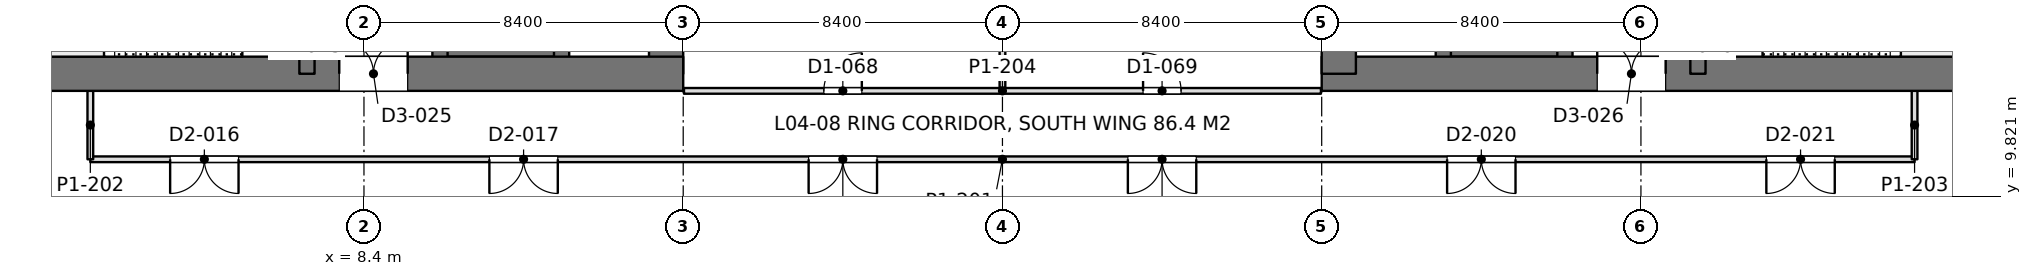
"""IFC4 building model, lengths in metres.
Left out: names, types, materials, properties, quantities, classifications, styles, units other than length and angle.
Written with IfcOpenShell. Run it as: python <this file> out.ifc"""

import sys

from ifc_helpers import new_model, si_unit, direction, frame, frame_2d, origin, place, context, subcontext, project, spatial, rectangle, extrude, element, fill, save


model = new_model("IFC4")
c1 = context("Model", 3, precision=1e-05, world=origin(), true_north=direction((0.0, 1.0)))
c2 = subcontext(c1, "Body", "Model", "MODEL_VIEW")
j1 = project(units=[si_unit("LENGTHUNIT", "METRE"), si_unit("PLANEANGLEUNIT", "RADIAN")], contexts=[c1])
p1 = place(None, origin())
s1 = spatial("IfcSite", under=j1, at=p1, CompositionType="ELEMENT")
p2 = place(p1, origin())
s2 = spatial("IfcBuilding", under=s1, at=p2, CompositionType="ELEMENT")
p3 = place(p2, frame((0.0, 0.0, 18.9)))
s3 = spatial("IfcBuildingStorey", under=s2, at=p3, CompositionType="ELEMENT", Elevation=18.9)
p4 = place(p3, frame((-1.2, 13.05, 0.0), z_axis=(0.0, 0.0, 1.0), x_axis=(1.0, 0.0, 0.0)))
e1 = element("IfcWall", 1, at=p4, inside=s3, PredefinedType="SHEAR", context=c2, shape_type="SweptSolid", body=[
    extrude(rectangle(XDim=18.0, YDim=0.9, at=frame_2d((9.0, 0.0))), origin(), (0.0, 0.0, 1.0), 4.5),
])
p5 = place(p4, frame((8.95, 0.0, 0.0)))
e2 = element("IfcOpeningElement", 2, at=p5, cuts=e1, PredefinedType="OPENING", context=c2, shape_type="SweptSolid", body=[
    extrude(rectangle(XDim=1.8, YDim=2.4, at=frame_2d((0.9, 1.2))), frame((0.0, 0.46, 0.0), z_axis=(0.0, -1.0, 0.0), x_axis=(1.0, 0.0, 0.0)), (0.0, 0.0, 1.0), 0.92),
])
p6 = place(p3, frame((16.35, 13.05, 0.0), z_axis=(0.0, 0.0, 1.0), x_axis=(0.0, 1.0, 0.0)))
e3 = element("IfcWall", 3, at=p6, inside=s3, PredefinedType="SHEAR", context=c2, shape_type="SweptSolid", body=[
    extrude(rectangle(XDim=24.3, YDim=0.9, at=frame_2d((12.15, 0.0))), origin(), (0.0, 0.0, 1.0), 4.5),
])
p7 = place(p3, frame((6.9, 13.05, 0.0), z_axis=(0.0, 0.0, 1.0), x_axis=(0.0, 1.0, 0.0)))
e4 = element("IfcWall", 4, at=p7, inside=s3, PredefinedType="SHEAR", context=c2, shape_type="SweptSolid", body=[
    extrude(rectangle(XDim=24.3, YDim=0.4, at=frame_2d((12.15, 0.0))), origin(), (0.0, 0.0, 1.0), 4.5),
])
p8 = place(p7, frame((1.3, 0.0, 0.0)))
e5 = element("IfcOpeningElement", 5, at=p8, cuts=e4, PredefinedType="OPENING", context=c2, shape_type="SweptSolid", body=[
    extrude(rectangle(XDim=1.0, YDim=2.2, at=frame_2d((0.5, 1.1))), frame((0.0, 0.21, 0.0), z_axis=(0.0, -1.0, 0.0), x_axis=(1.0, 0.0, 0.0)), (0.0, 0.0, 1.0), 0.42),
])
p9 = place(p7, frame((22.0, 0.0, 0.0)))
e6 = element("IfcOpeningElement", 6, at=p9, cuts=e4, PredefinedType="OPENING", context=c2, shape_type="SweptSolid", body=[
    extrude(rectangle(XDim=1.0, YDim=2.2, at=frame_2d((0.5, 1.1))), frame((0.0, 0.21, 0.0), z_axis=(0.0, -1.0, 0.0), x_axis=(1.0, 0.0, 0.0)), (0.0, 0.0, 1.0), 0.42),
])
p10 = place(p7, frame((5.55, 0.0, 0.0)))
e7 = element("IfcOpeningElement", 7, at=p10, cuts=e4, PredefinedType="OPENING", context=c2, shape_type="SweptSolid", body=[
    extrude(rectangle(XDim=1.0, YDim=2.2, at=frame_2d((0.5, 1.1))), frame((0.0, 0.21, 0.0), z_axis=(0.0, -1.0, 0.0), x_axis=(1.0, 0.0, 0.0)), (0.0, 0.0, 1.0), 0.42),
])
p11 = place(p7, frame((9.55, 0.0, 0.0)))
e8 = element("IfcOpeningElement", 8, at=p11, cuts=e4, PredefinedType="OPENING", context=c2, shape_type="SweptSolid", body=[
    extrude(rectangle(XDim=1.0, YDim=2.2, at=frame_2d((0.5, 1.1))), frame((0.0, 0.21, 0.0), z_axis=(0.0, -1.0, 0.0), x_axis=(1.0, 0.0, 0.0)), (0.0, 0.0, 1.0), 0.42),
])
p12 = place(p7, frame((12.8, 0.0, 0.0)))
e9 = element("IfcOpeningElement", 9, at=p12, cuts=e4, PredefinedType="OPENING", context=c2, shape_type="SweptSolid", body=[
    extrude(rectangle(XDim=1.1, YDim=2.2, at=frame_2d((0.55, 1.1))), frame((0.0, 0.21, 0.0), z_axis=(0.0, -1.0, 0.0), x_axis=(1.0, 0.0, 0.0)), (0.0, 0.0, 1.0), 0.42),
])
p13 = place(p7, frame((15.538, 0.0, 0.0)))
e10 = element("IfcOpeningElement", 10, at=p13, cuts=e4, PredefinedType="OPENING", context=c2, shape_type="SweptSolid", body=[
    extrude(rectangle(XDim=1.1, YDim=2.2, at=frame_2d((0.55, 1.1))), frame((0.0, 0.21, 0.0), z_axis=(0.0, -1.0, 0.0), x_axis=(1.0, 0.0, 0.0)), (0.0, 0.0, 1.0), 0.42),
])
p14 = place(p7, frame((18.262, 0.0, 0.0)))
e11 = element("IfcOpeningElement", 11, at=p14, cuts=e4, PredefinedType="OPENING", context=c2, shape_type="SweptSolid", body=[
    extrude(rectangle(XDim=1.1, YDim=2.2, at=frame_2d((0.55, 1.1))), frame((0.0, 0.21, 0.0), z_axis=(0.0, -1.0, 0.0), x_axis=(1.0, 0.0, 0.0)), (0.0, 0.0, 1.0), 0.42),
])
p15 = place(p3, frame((10.4, 13.05, 0.0), z_axis=(0.0, 0.0, 1.0), x_axis=(0.0, 1.0, 0.0)))
e12 = element("IfcWall", 12, at=p15, inside=s3, PredefinedType="SHEAR", context=c2, shape_type="SweptSolid", body=[
    extrude(rectangle(XDim=24.3, YDim=0.4, at=frame_2d((12.15, 0.0))), origin(), (0.0, 0.0, 1.0), 4.5),
])
p16 = place(p15, frame((1.5, 0.0, 0.0)))
e13 = element("IfcOpeningElement", 13, at=p16, cuts=e12, PredefinedType="OPENING", context=c2, shape_type="SweptSolid", body=[
    extrude(rectangle(XDim=1.1, YDim=2.2, at=frame_2d((0.55, 1.1))), frame((0.0, 0.21, 0.0), z_axis=(0.0, -1.0, 0.0), x_axis=(1.0, 0.0, 0.0)), (0.0, 0.0, 1.0), 0.42),
])
p17 = place(p15, frame((4.35, 0.0, 0.0)))
e14 = element("IfcOpeningElement", 14, at=p17, cuts=e12, PredefinedType="OPENING", context=c2, shape_type="SweptSolid", body=[
    extrude(rectangle(XDim=1.1, YDim=2.2, at=frame_2d((0.55, 1.1))), frame((0.0, 0.21, 0.0), z_axis=(0.0, -1.0, 0.0), x_axis=(1.0, 0.0, 0.0)), (0.0, 0.0, 1.0), 0.42),
])
p18 = place(p15, frame((7.2, 0.0, 0.0)))
e15 = element("IfcOpeningElement", 15, at=p18, cuts=e12, PredefinedType="OPENING", context=c2, shape_type="SweptSolid", body=[
    extrude(rectangle(XDim=1.1, YDim=2.2, at=frame_2d((0.55, 1.1))), frame((0.0, 0.21, 0.0), z_axis=(0.0, -1.0, 0.0), x_axis=(1.0, 0.0, 0.0)), (0.0, 0.0, 1.0), 0.42),
])
p19 = place(p15, frame((21.45, 0.0, 0.0)))
e16 = element("IfcOpeningElement", 16, at=p19, cuts=e12, PredefinedType="OPENING", context=c2, shape_type="SweptSolid", body=[
    extrude(rectangle(XDim=1.1, YDim=2.2, at=frame_2d((0.55, 1.1))), frame((0.0, 0.21, 0.0), z_axis=(0.0, -1.0, 0.0), x_axis=(1.0, 0.0, 0.0)), (0.0, 0.0, 1.0), 0.42),
])
p20 = place(p3, frame((13.6, 13.05, 0.0), z_axis=(0.0, 0.0, 1.0), x_axis=(0.0, 1.0, 0.0)))
e17 = element("IfcWall", 17, at=p20, inside=s3, PredefinedType="SHEAR", context=c2, shape_type="SweptSolid", body=[
    extrude(rectangle(XDim=24.3, YDim=0.4, at=frame_2d((12.15, 0.0))), origin(), (0.0, 0.0, 1.0), 4.5),
])
p21 = place(p3, frame((10.4, 13.65, 0.0), z_axis=(0.0, 0.0, 1.0), x_axis=(1.0, 0.0, 0.0)))
e18 = element("IfcWall", 18, at=p21, inside=s3, PredefinedType="SHEAR", context=c2, shape_type="SweptSolid", body=[
    extrude(rectangle(XDim=3.2, YDim=0.3, at=frame_2d((1.6, 0.0))), origin(), (0.0, 0.0, 1.0), 4.5),
])
p22 = place(p3, frame((33.6, 13.05, 0.0), z_axis=(0.0, 0.0, 1.0), x_axis=(1.0, 0.0, 0.0)))
e19 = element("IfcWall", 19, at=p22, inside=s3, PredefinedType="SHEAR", context=c2, shape_type="SweptSolid", body=[
    extrude(rectangle(XDim=18.0, YDim=0.9, at=frame_2d((9.0, 0.0))), origin(), (0.0, 0.0, 1.0), 4.5),
])
p23 = place(p22, frame((7.25, 0.0, 0.0)))
e20 = element("IfcOpeningElement", 20, at=p23, cuts=e19, PredefinedType="OPENING", context=c2, shape_type="SweptSolid", body=[
    extrude(rectangle(XDim=1.8, YDim=2.4, at=frame_2d((0.9, 1.2))), frame((0.0, 0.46, 0.0), z_axis=(0.0, -1.0, 0.0), x_axis=(1.0, 0.0, 0.0)), (0.0, 0.0, 1.0), 0.92),
])
p24 = place(p3, frame((34.05, 13.05, 0.0), z_axis=(0.0, 0.0, 1.0), x_axis=(0.0, 1.0, 0.0)))
e21 = element("IfcWall", 21, at=p24, inside=s3, PredefinedType="SHEAR", context=c2, shape_type="SweptSolid", body=[
    extrude(rectangle(XDim=24.3, YDim=0.9, at=frame_2d((12.15, 0.0))), origin(), (0.0, 0.0, 1.0), 4.5),
])
p25 = place(p3, frame((43.5, 13.05, 0.0), z_axis=(0.0, 0.0, 1.0), x_axis=(0.0, 1.0, 0.0)))
e22 = element("IfcWall", 22, at=p25, inside=s3, PredefinedType="SHEAR", context=c2, shape_type="SweptSolid", body=[
    extrude(rectangle(XDim=24.3, YDim=0.4, at=frame_2d((12.15, 0.0))), origin(), (0.0, 0.0, 1.0), 4.5),
])
p26 = place(p25, frame((1.3, 0.0, 0.0)))
e23 = element("IfcOpeningElement", 23, at=p26, cuts=e22, PredefinedType="OPENING", context=c2, shape_type="SweptSolid", body=[
    extrude(rectangle(XDim=1.0, YDim=2.2, at=frame_2d((0.5, 1.1))), frame((0.0, 0.21, 0.0), z_axis=(0.0, -1.0, 0.0), x_axis=(1.0, 0.0, 0.0)), (0.0, 0.0, 1.0), 0.42),
])
p27 = place(p25, frame((22.0, 0.0, 0.0)))
e24 = element("IfcOpeningElement", 24, at=p27, cuts=e22, PredefinedType="OPENING", context=c2, shape_type="SweptSolid", body=[
    extrude(rectangle(XDim=1.0, YDim=2.2, at=frame_2d((0.5, 1.1))), frame((0.0, 0.21, 0.0), z_axis=(0.0, -1.0, 0.0), x_axis=(1.0, 0.0, 0.0)), (0.0, 0.0, 1.0), 0.42),
])
p28 = place(p25, frame((5.55, 0.0, 0.0)))
e25 = element("IfcOpeningElement", 25, at=p28, cuts=e22, PredefinedType="OPENING", context=c2, shape_type="SweptSolid", body=[
    extrude(rectangle(XDim=1.0, YDim=2.2, at=frame_2d((0.5, 1.1))), frame((0.0, 0.21, 0.0), z_axis=(0.0, -1.0, 0.0), x_axis=(1.0, 0.0, 0.0)), (0.0, 0.0, 1.0), 0.42),
])
p29 = place(p25, frame((9.55, 0.0, 0.0)))
e26 = element("IfcOpeningElement", 26, at=p29, cuts=e22, PredefinedType="OPENING", context=c2, shape_type="SweptSolid", body=[
    extrude(rectangle(XDim=1.0, YDim=2.2, at=frame_2d((0.5, 1.1))), frame((0.0, 0.21, 0.0), z_axis=(0.0, -1.0, 0.0), x_axis=(1.0, 0.0, 0.0)), (0.0, 0.0, 1.0), 0.42),
])
p30 = place(p25, frame((12.8, 0.0, 0.0)))
e27 = element("IfcOpeningElement", 27, at=p30, cuts=e22, PredefinedType="OPENING", context=c2, shape_type="SweptSolid", body=[
    extrude(rectangle(XDim=1.1, YDim=2.2, at=frame_2d((0.55, 1.1))), frame((0.0, 0.21, 0.0), z_axis=(0.0, -1.0, 0.0), x_axis=(1.0, 0.0, 0.0)), (0.0, 0.0, 1.0), 0.42),
])
p31 = place(p25, frame((15.538, 0.0, 0.0)))
e28 = element("IfcOpeningElement", 28, at=p31, cuts=e22, PredefinedType="OPENING", context=c2, shape_type="SweptSolid", body=[
    extrude(rectangle(XDim=1.1, YDim=2.2, at=frame_2d((0.55, 1.1))), frame((0.0, 0.21, 0.0), z_axis=(0.0, -1.0, 0.0), x_axis=(1.0, 0.0, 0.0)), (0.0, 0.0, 1.0), 0.42),
])
p32 = place(p25, frame((18.262, 0.0, 0.0)))
e29 = element("IfcOpeningElement", 29, at=p32, cuts=e22, PredefinedType="OPENING", context=c2, shape_type="SweptSolid", body=[
    extrude(rectangle(XDim=1.1, YDim=2.2, at=frame_2d((0.55, 1.1))), frame((0.0, 0.21, 0.0), z_axis=(0.0, -1.0, 0.0), x_axis=(1.0, 0.0, 0.0)), (0.0, 0.0, 1.0), 0.42),
])
p33 = place(p3, frame((40.0, 13.05, 0.0), z_axis=(0.0, 0.0, 1.0), x_axis=(0.0, 1.0, 0.0)))
e30 = element("IfcWall", 30, at=p33, inside=s3, PredefinedType="SHEAR", context=c2, shape_type="SweptSolid", body=[
    extrude(rectangle(XDim=24.3, YDim=0.4, at=frame_2d((12.15, 0.0))), origin(), (0.0, 0.0, 1.0), 4.5),
])
p34 = place(p33, frame((1.5, 0.0, 0.0)))
e31 = element("IfcOpeningElement", 31, at=p34, cuts=e30, PredefinedType="OPENING", context=c2, shape_type="SweptSolid", body=[
    extrude(rectangle(XDim=1.1, YDim=2.2, at=frame_2d((0.55, 1.1))), frame((0.0, 0.21, 0.0), z_axis=(0.0, -1.0, 0.0), x_axis=(1.0, 0.0, 0.0)), (0.0, 0.0, 1.0), 0.42),
])
p35 = place(p33, frame((4.35, 0.0, 0.0)))
e32 = element("IfcOpeningElement", 32, at=p35, cuts=e30, PredefinedType="OPENING", context=c2, shape_type="SweptSolid", body=[
    extrude(rectangle(XDim=1.1, YDim=2.2, at=frame_2d((0.55, 1.1))), frame((0.0, 0.21, 0.0), z_axis=(0.0, -1.0, 0.0), x_axis=(1.0, 0.0, 0.0)), (0.0, 0.0, 1.0), 0.42),
])
p36 = place(p33, frame((7.2, 0.0, 0.0)))
e33 = element("IfcOpeningElement", 33, at=p36, cuts=e30, PredefinedType="OPENING", context=c2, shape_type="SweptSolid", body=[
    extrude(rectangle(XDim=1.1, YDim=2.2, at=frame_2d((0.55, 1.1))), frame((0.0, 0.21, 0.0), z_axis=(0.0, -1.0, 0.0), x_axis=(1.0, 0.0, 0.0)), (0.0, 0.0, 1.0), 0.42),
])
p37 = place(p33, frame((21.45, 0.0, 0.0)))
e34 = element("IfcOpeningElement", 34, at=p37, cuts=e30, PredefinedType="OPENING", context=c2, shape_type="SweptSolid", body=[
    extrude(rectangle(XDim=1.1, YDim=2.2, at=frame_2d((0.55, 1.1))), frame((0.0, 0.21, 0.0), z_axis=(0.0, -1.0, 0.0), x_axis=(1.0, 0.0, 0.0)), (0.0, 0.0, 1.0), 0.42),
])
p38 = place(p3, frame((36.8, 13.05, 0.0), z_axis=(0.0, 0.0, 1.0), x_axis=(0.0, 1.0, 0.0)))
e35 = element("IfcWall", 35, at=p38, inside=s3, PredefinedType="SHEAR", context=c2, shape_type="SweptSolid", body=[
    extrude(rectangle(XDim=24.3, YDim=0.4, at=frame_2d((12.15, 0.0))), origin(), (0.0, 0.0, 1.0), 4.5),
])
p39 = place(p3, frame((40.0, 13.65, 0.0), z_axis=(0.0, 0.0, 1.0), x_axis=(-1.0, 0.0, 0.0)))
e36 = element("IfcWall", 36, at=p39, inside=s3, PredefinedType="SHEAR", context=c2, shape_type="SweptSolid", body=[
    extrude(rectangle(XDim=3.2, YDim=0.3, at=frame_2d((1.6, 0.0))), origin(), (0.0, 0.0, 1.0), 4.5),
])
p40 = place(p3, frame((1.2, 10.8, 0.0), z_axis=(0.0, 0.0, 1.0), x_axis=(1.0, 0.0, 0.0)))
e37 = element("IfcWall", 37, at=p40, inside=s3, PredefinedType="PARTITIONING", context=c2, shape_type="SweptSolid", body=[
    extrude(rectangle(XDim=48.0, YDim=0.15, at=frame_2d((24.0, 0.0))), origin(), (0.0, 0.0, 1.0), 3.74),
])
p41 = place(p40, frame((2.1, 0.0, 0.0)))
e38 = element("IfcOpeningElement", 38, at=p41, cuts=e37, PredefinedType="OPENING", context=c2, shape_type="SweptSolid", body=[
    extrude(rectangle(XDim=1.8, YDim=2.2, at=frame_2d((0.9, 1.1))), frame((0.0, 0.085, 0.0), z_axis=(0.0, -1.0, 0.0), x_axis=(1.0, 0.0, 0.0)), (0.0, 0.0, 1.0), 0.17),
])
p42 = place(p40, frame((10.5, 0.0, 0.0)))
e39 = element("IfcOpeningElement", 39, at=p42, cuts=e37, PredefinedType="OPENING", context=c2, shape_type="SweptSolid", body=[
    extrude(rectangle(XDim=1.8, YDim=2.2, at=frame_2d((0.9, 1.1))), frame((0.0, 0.085, 0.0), z_axis=(0.0, -1.0, 0.0), x_axis=(1.0, 0.0, 0.0)), (0.0, 0.0, 1.0), 0.17),
])
p43 = place(p40, frame((18.9, 0.0, 0.0)))
e40 = element("IfcOpeningElement", 40, at=p43, cuts=e37, PredefinedType="OPENING", context=c2, shape_type="SweptSolid", body=[
    extrude(rectangle(XDim=1.8, YDim=2.2, at=frame_2d((0.9, 1.1))), frame((0.0, 0.085, 0.0), z_axis=(0.0, -1.0, 0.0), x_axis=(1.0, 0.0, 0.0)), (0.0, 0.0, 1.0), 0.17),
])
p44 = place(p40, frame((27.3, 0.0, 0.0)))
e41 = element("IfcOpeningElement", 41, at=p44, cuts=e37, PredefinedType="OPENING", context=c2, shape_type="SweptSolid", body=[
    extrude(rectangle(XDim=1.8, YDim=2.2, at=frame_2d((0.9, 1.1))), frame((0.0, 0.085, 0.0), z_axis=(0.0, -1.0, 0.0), x_axis=(1.0, 0.0, 0.0)), (0.0, 0.0, 1.0), 0.17),
])
p45 = place(p40, frame((35.7, 0.0, 0.0)))
e42 = element("IfcOpeningElement", 42, at=p45, cuts=e37, PredefinedType="OPENING", context=c2, shape_type="SweptSolid", body=[
    extrude(rectangle(XDim=1.8, YDim=2.2, at=frame_2d((0.9, 1.1))), frame((0.0, 0.085, 0.0), z_axis=(0.0, -1.0, 0.0), x_axis=(1.0, 0.0, 0.0)), (0.0, 0.0, 1.0), 0.17),
])
p46 = place(p40, frame((44.1, 0.0, 0.0)))
e43 = element("IfcOpeningElement", 43, at=p46, cuts=e37, PredefinedType="OPENING", context=c2, shape_type="SweptSolid", body=[
    extrude(rectangle(XDim=1.8, YDim=2.2, at=frame_2d((0.9, 1.1))), frame((0.0, 0.085, 0.0), z_axis=(0.0, -1.0, 0.0), x_axis=(1.0, 0.0, 0.0)), (0.0, 0.0, 1.0), 0.17),
])
for number, where, z_axis, x_axis in (
    (44, (1.2, 10.8, 0.0), (0.0, 0.0, 1.0), (0.0, 1.0, 0.0)),
    (45, (49.2, 10.8, 0.0), (0.0, 0.0, 1.0), (0.0, 1.0, 0.0)),
):
    element("IfcWall", number, at=place(p3, frame(where, z_axis=z_axis, x_axis=x_axis)), inside=s3, PredefinedType="PARTITIONING", context=c2, shape_type="SweptSolid", body=[
        extrude(rectangle(XDim=1.802, YDim=0.15, at=frame_2d((0.901, 0.0))), origin(), (0.0, 0.0, 1.0), 4.34),
    ])
p47 = place(p3, frame((25.2, 12.674, 0.0), z_axis=(0.0, 0.0, 1.0), x_axis=(0.0, 1.0, 0.0)))
e46 = element("IfcWall", 46, at=p47, inside=s3, PredefinedType="PARTITIONING", context=c2, shape_type="SweptSolid", body=[
    extrude(rectangle(XDim=3.527, YDim=0.15, at=frame_2d((1.763, 0.0))), origin(), (0.0, 0.0, 1.0), 3.74),
])
p48 = place(p3, frame((16.82, 12.6, 0.0), z_axis=(0.0, 0.0, 1.0), x_axis=(1.0, 0.0, 0.0)))
e47 = element("IfcWall", 47, at=p48, inside=s3, PredefinedType="PARTITIONING", context=c2, shape_type="SweptSolid", body=[
    extrude(rectangle(XDim=16.76, YDim=0.15, at=frame_2d((8.38, 0.0))), origin(), (0.0, 0.0, 1.0), 3.74),
])
p49 = place(p48, frame((3.68, 0.0, 0.0)))
e48 = element("IfcOpeningElement", 48, at=p49, cuts=e47, PredefinedType="OPENING", context=c2, shape_type="SweptSolid", body=[
    extrude(rectangle(XDim=1.0, YDim=2.2, at=frame_2d((0.5, 1.1))), frame((0.0, 0.085, 0.0), z_axis=(0.0, -1.0, 0.0), x_axis=(1.0, 0.0, 0.0)), (0.0, 0.0, 1.0), 0.17),
])
p50 = place(p48, frame((12.08, 0.0, 0.0)))
e49 = element("IfcOpeningElement", 49, at=p50, cuts=e47, PredefinedType="OPENING", context=c2, shape_type="SweptSolid", body=[
    extrude(rectangle(XDim=1.0, YDim=2.2, at=frame_2d((0.5, 1.1))), frame((0.0, 0.085, 0.0), z_axis=(0.0, -1.0, 0.0), x_axis=(1.0, 0.0, 0.0)), (0.0, 0.0, 1.0), 0.17),
])
p51 = place(p5, origin())
e50 = element("IfcDoor", 50, at=p51, inside=s3, OperationType="DOUBLE_DOOR_SINGLE_SWING", PredefinedType="DOOR", context=c2, shape_type="SweptSolid", body=[
    extrude(rectangle(XDim=1.8, YDim=2.4, at=frame_2d((0.9, 1.2))), frame((0.0, 0.025, 0.0), z_axis=(0.0, -1.0, 0.0), x_axis=(1.0, 0.0, 0.0)), (0.0, 0.0, 1.0), 0.05),
])
fill(e2, e50)
p52 = place(p23, origin())
e51 = element("IfcDoor", 51, at=p52, inside=s3, OperationType="DOUBLE_DOOR_SINGLE_SWING", PredefinedType="DOOR", context=c2, shape_type="SweptSolid", body=[
    extrude(rectangle(XDim=1.8, YDim=2.4, at=frame_2d((0.9, 1.2))), frame((0.0, 0.025, 0.0), z_axis=(0.0, -1.0, 0.0), x_axis=(1.0, 0.0, 0.0)), (0.0, 0.0, 1.0), 0.05),
])
fill(e20, e51)
p53 = place(p41, frame((1.8, 0.0, 0.0), z_axis=(0.0, 0.0, 1.0), x_axis=(-1.0, 0.0, 0.0)))
e52 = element("IfcDoor", 52, at=p53, inside=s3, OperationType="DOUBLE_DOOR_SINGLE_SWING", PredefinedType="DOOR", context=c2, shape_type="SweptSolid", body=[
    extrude(rectangle(XDim=1.8, YDim=2.2, at=frame_2d((0.9, 1.1))), frame((0.0, 0.025, 0.0), z_axis=(0.0, -1.0, 0.0), x_axis=(1.0, 0.0, 0.0)), (0.0, 0.0, 1.0), 0.05),
])
fill(e38, e52)
p54 = place(p42, frame((1.8, 0.0, 0.0), z_axis=(0.0, 0.0, 1.0), x_axis=(-1.0, 0.0, 0.0)))
e53 = element("IfcDoor", 53, at=p54, inside=s3, OperationType="DOUBLE_DOOR_SINGLE_SWING", PredefinedType="DOOR", context=c2, shape_type="SweptSolid", body=[
    extrude(rectangle(XDim=1.8, YDim=2.2, at=frame_2d((0.9, 1.1))), frame((0.0, 0.025, 0.0), z_axis=(0.0, -1.0, 0.0), x_axis=(1.0, 0.0, 0.0)), (0.0, 0.0, 1.0), 0.05),
])
fill(e39, e53)
p55 = place(p43, frame((1.8, 0.0, 0.0), z_axis=(0.0, 0.0, 1.0), x_axis=(-1.0, 0.0, 0.0)))
e54 = element("IfcDoor", 54, at=p55, inside=s3, OperationType="DOUBLE_DOOR_SINGLE_SWING", PredefinedType="DOOR", context=c2, shape_type="SweptSolid", body=[
    extrude(rectangle(XDim=1.8, YDim=2.2, at=frame_2d((0.9, 1.1))), frame((0.0, 0.025, 0.0), z_axis=(0.0, -1.0, 0.0), x_axis=(1.0, 0.0, 0.0)), (0.0, 0.0, 1.0), 0.05),
])
fill(e40, e54)
p56 = place(p44, frame((1.8, 0.0, 0.0), z_axis=(0.0, 0.0, 1.0), x_axis=(-1.0, 0.0, 0.0)))
e55 = element("IfcDoor", 55, at=p56, inside=s3, OperationType="DOUBLE_DOOR_SINGLE_SWING", PredefinedType="DOOR", context=c2, shape_type="SweptSolid", body=[
    extrude(rectangle(XDim=1.8, YDim=2.2, at=frame_2d((0.9, 1.1))), frame((0.0, 0.025, 0.0), z_axis=(0.0, -1.0, 0.0), x_axis=(1.0, 0.0, 0.0)), (0.0, 0.0, 1.0), 0.05),
])
fill(e41, e55)
p57 = place(p45, frame((1.8, 0.0, 0.0), z_axis=(0.0, 0.0, 1.0), x_axis=(-1.0, 0.0, 0.0)))
e56 = element("IfcDoor", 56, at=p57, inside=s3, OperationType="DOUBLE_DOOR_SINGLE_SWING", PredefinedType="DOOR", context=c2, shape_type="SweptSolid", body=[
    extrude(rectangle(XDim=1.8, YDim=2.2, at=frame_2d((0.9, 1.1))), frame((0.0, 0.025, 0.0), z_axis=(0.0, -1.0, 0.0), x_axis=(1.0, 0.0, 0.0)), (0.0, 0.0, 1.0), 0.05),
])
fill(e42, e56)
p58 = place(p46, frame((1.8, 0.0, 0.0), z_axis=(0.0, 0.0, 1.0), x_axis=(-1.0, 0.0, 0.0)))
e57 = element("IfcDoor", 57, at=p58, inside=s3, OperationType="DOUBLE_DOOR_SINGLE_SWING", PredefinedType="DOOR", context=c2, shape_type="SweptSolid", body=[
    extrude(rectangle(XDim=1.8, YDim=2.2, at=frame_2d((0.9, 1.1))), frame((0.0, 0.025, 0.0), z_axis=(0.0, -1.0, 0.0), x_axis=(1.0, 0.0, 0.0)), (0.0, 0.0, 1.0), 0.05),
])
fill(e43, e57)
p59 = place(p49, origin())
e58 = element("IfcDoor", 58, at=p59, inside=s3, OperationType="SINGLE_SWING_RIGHT", PredefinedType="DOOR", context=c2, shape_type="SweptSolid", body=[
    extrude(rectangle(XDim=1.0, YDim=2.2, at=frame_2d((0.5, 1.1))), frame((0.0, 0.025, 0.0), z_axis=(0.0, -1.0, 0.0), x_axis=(1.0, 0.0, 0.0)), (0.0, 0.0, 1.0), 0.05),
])
fill(e48, e58)
p60 = place(p50, origin())
e59 = element("IfcDoor", 59, at=p60, inside=s3, OperationType="SINGLE_SWING_LEFT", PredefinedType="DOOR", context=c2, shape_type="SweptSolid", body=[
    extrude(rectangle(XDim=1.0, YDim=2.2, at=frame_2d((0.5, 1.1))), frame((0.0, 0.025, 0.0), z_axis=(0.0, -1.0, 0.0), x_axis=(1.0, 0.0, 0.0)), (0.0, 0.0, 1.0), 0.05),
])
fill(e49, e59)
save(model, sys.argv[1])
